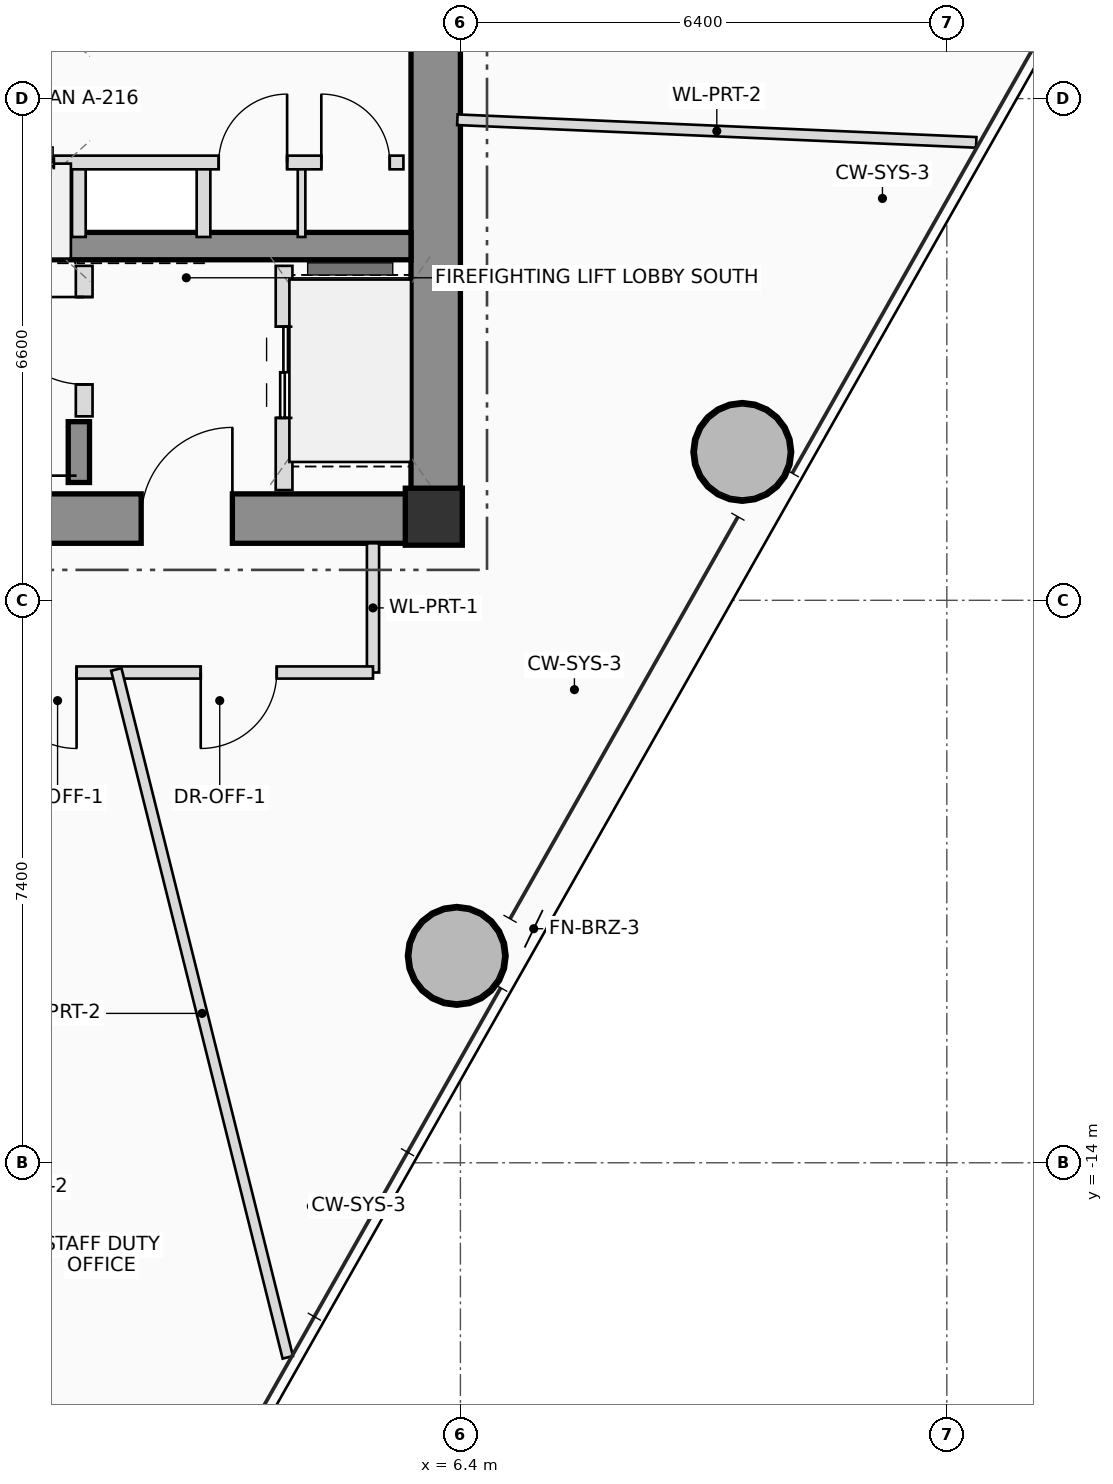
"""IFC4 building model, lengths in metres.
Left out: names, types, materials, properties, quantities, classifications, styles, units other than length and angle.
Written with IfcOpenShell. Run it as: python <this file> out.ifc"""

import sys

from ifc_helpers import new_model, si_unit, direction, frame, frame_2d, origin, origin_2d, place, context, subcontext, project, spatial, rectangle, hollow_circle, extrude, source, transform, mapped, element, fill, save


model = new_model("IFC4")
c1 = context("Model", 3, precision=1e-05, world=origin(), true_north=direction((0.0, 1.0)))
c2 = subcontext(c1, "Body", "Model", "MODEL_VIEW")
j1 = project(units=[si_unit("LENGTHUNIT", "METRE"), si_unit("PLANEANGLEUNIT", "RADIAN")], contexts=[c1])
p1 = place(None, origin())
s1 = spatial("IfcSite", under=j1, at=p1, CompositionType="ELEMENT")
p2 = place(p1, origin())
s2 = spatial("IfcBuilding", under=s1, at=p2, CompositionType="ELEMENT")
p3 = place(p2, frame((0.0, 0.0, 169.1)))
s3 = spatial("IfcBuildingStorey", under=s2, at=p3, CompositionType="ELEMENT", Elevation=169.1)
m1 = source(origin(), c2, "Body", "SweptSolid", [
    extrude(rectangle(XDim=0.75, YDim=0.75, at=origin_2d()), origin(), (0.0, 0.0, 1.0), 3.45),
])
p4 = place(p3, frame((6.05, -5.5, 0.0), z_axis=(0.0, 0.0, 1.0), x_axis=(1.0, 0.0, 0.0)))
e1 = element("IfcColumn", 1, at=p4, inside=s3, PredefinedType="COLUMN", context=c2, shape_type="MappedRepresentation", body=[
    mapped(m1, transform((0.0, 0.0, 0.0), scale=1.0)),
])
p5 = place(p3, frame((-6.4, -5.525, 0.0), z_axis=(0.0, 0.0, 1.0), x_axis=(1.0, 0.0, 0.0)))
e2 = element("IfcWall", 2, at=p5, inside=s3, PredefinedType="SHEAR", context=c2, shape_type="SweptSolid", body=[
    extrude(rectangle(XDim=12.8, YDim=0.65, at=frame_2d((6.4, 0.0))), origin(), (0.0, 0.0, 1.0), 3.45),
])
p6 = place(p5, frame((8.6, 0.0, 0.0)))
e3 = element("IfcOpeningElement", 3, at=p6, cuts=e2, PredefinedType="OPENING", context=c2, shape_type="SweptSolid", body=[
    extrude(rectangle(XDim=1.2, YDim=2.2, at=frame_2d((0.6, 1.1))), frame((0.0, 0.335, 0.0), z_axis=(0.0, -1.0, 0.0), x_axis=(1.0, 0.0, 0.0)), (0.0, 0.0, 1.0), 0.67),
])
p7 = place(p3, frame((6.075, -5.2, 0.0), z_axis=(0.0, 0.0, 1.0), x_axis=(0.0, 1.0, 0.0)))
e4 = element("IfcWall", 4, at=p7, inside=s3, PredefinedType="SHEAR", context=c2, shape_type="SweptSolid", body=[
    extrude(rectangle(XDim=10.4, YDim=0.65, at=frame_2d((5.2, 0.0))), origin(), (0.0, 0.0, 1.0), 3.45),
])
p8 = place(p3, frame((-5.75, -1.94, 0.0), z_axis=(0.0, 0.0, 1.0), x_axis=(1.0, 0.0, 0.0)))
e5 = element("IfcWall", 5, at=p8, inside=s3, PredefinedType="SHEAR", context=c2, shape_type="SweptSolid", body=[
    extrude(rectangle(XDim=11.5, YDim=0.36, at=frame_2d((5.75, 0.0))), origin(), (0.0, 0.0, 1.0), 3.45),
])
p9 = place(p3, frame((1.38, -5.05, 0.0), z_axis=(0.0, 0.0, 1.0), x_axis=(0.0, 1.0, 0.0)))
e6 = element("IfcWall", 6, at=p9, inside=s3, PredefinedType="SHEAR", context=c2, shape_type="SweptSolid", body=[
    extrude(rectangle(XDim=0.8, YDim=0.28, at=frame_2d((0.4, 0.0))), origin(), (0.0, 0.0, 1.0), 3.45),
])
m2 = source(origin(), c2, "Body", "SweptSolid", [
    extrude(hollow_circle(Radius=0.65, WallThickness=0.045, at=origin_2d()), origin(), (0.0, 0.0, 1.0), 3.45),
])
for number, where, z_axis, x_axis in (
    (7, (6.352, -11.278, 0.0), (0.0, 0.0, 1.0), (1.0, 0.0, 0.0)),
    (8, (10.109, -4.648, 0.0), (0.0, 0.0, 1.0), (1.0, 0.0, 0.0)),
):
    element("IfcColumn", number, at=place(p3, frame(where, z_axis=z_axis, x_axis=x_axis)), inside=s3, PredefinedType="COLUMN", context=c2, shape_type="MappedRepresentation", body=[
        mapped(m2, transform((0.0, 0.0, 0.0), scale=1.0)),
    ])
p10 = place(p3, frame((1.45, -4.18, 0.0), z_axis=(0.0, 0.0, 1.0), x_axis=(0.0, 1.0, 0.0)))
e9 = element("IfcWall", 9, at=p10, inside=s3, PredefinedType="PLUMBINGWALL", context=c2, shape_type="SweptSolid", body=[
    extrude(rectangle(XDim=1.98, YDim=0.22, at=frame_2d((0.99, 0.0))), origin(), (0.0, 0.0, 1.0), 3.25),
])
p11 = place(p10, frame((0.42, 0.0, 0.0)))
e10 = element("IfcOpeningElement", 10, at=p11, cuts=e9, PredefinedType="OPENING", context=c2, shape_type="SweptSolid", body=[
    extrude(rectangle(XDim=1.15, YDim=2.15, at=frame_2d((0.575, 1.075))), frame((0.0, 0.12, 0.0), z_axis=(0.0, -1.0, 0.0), x_axis=(1.0, 0.0, 0.0)), (0.0, 0.0, 1.0), 0.24),
])
p12 = place(p3, frame((4.08, -5.15, 0.0), z_axis=(0.0, 0.0, 1.0), x_axis=(0.0, 1.0, 0.0)))
e11 = element("IfcWall", 11, at=p12, inside=s3, PredefinedType="PLUMBINGWALL", context=c2, shape_type="SweptSolid", body=[
    extrude(rectangle(XDim=2.95, YDim=0.22, at=frame_2d((1.475, 0.0))), origin(), (0.0, 0.0, 1.0), 3.25),
])
p13 = place(p12, frame((0.95, 0.0, 0.0)))
e12 = element("IfcOpeningElement", 12, at=p13, cuts=e11, PredefinedType="OPENING", context=c2, shape_type="SweptSolid", body=[
    extrude(rectangle(XDim=1.2, YDim=2.25, at=frame_2d((0.6, 1.125))), frame((0.0, 0.12, 0.0), z_axis=(0.0, -1.0, 0.0), x_axis=(1.0, 0.0, 0.0)), (0.0, 0.0, 1.0), 0.24),
])
for number, where, z_axis, x_axis in (
    (13, (1.38, -1.82, 0.0), (0.0, 0.0, 1.0), (0.0, 1.0, 0.0)),
    (14, (3.02, -1.82, 0.0), (0.0, 0.0, 1.0), (0.0, 1.0, 0.0)),
):
    element("IfcWall", number, at=place(p3, frame(where, z_axis=z_axis, x_axis=x_axis)), inside=s3, PredefinedType="PLUMBINGWALL", context=c2, shape_type="SweptSolid", body=[
        extrude(rectangle(XDim=0.98, YDim=0.18, at=frame_2d((0.49, 0.0))), origin(), (0.0, 0.0, 1.0), 3.25),
    ])
p14 = place(p3, frame((4.31, -1.82, 0.0), z_axis=(0.0, 0.0, 1.0), x_axis=(0.0, 1.0, 0.0)))
e15 = element("IfcWall", 15, at=p14, inside=s3, PredefinedType="PARTITIONING", context=c2, shape_type="SweptSolid", body=[
    extrude(rectangle(XDim=0.98, YDim=0.1, at=frame_2d((0.49, 0.0))), origin(), (0.0, 0.0, 1.0), 3.25),
])
p15 = place(p3, frame((-5.68, -0.84, 0.0), z_axis=(0.0, 0.0, 1.0), x_axis=(1.0, 0.0, 0.0)))
e16 = element("IfcWall", 16, at=p15, inside=s3, PredefinedType="PLUMBINGWALL", context=c2, shape_type="SweptSolid", body=[
    extrude(rectangle(XDim=11.33, YDim=0.18, at=frame_2d((5.665, 0.0))), origin(), (0.0, 0.0, 1.0), 3.25),
])
p16 = place(p15, frame((1.18, 0.0, 0.0)))
e17 = element("IfcOpeningElement", 17, at=p16, cuts=e16, PredefinedType="OPENING", context=c2, shape_type="SweptSolid", body=[
    extrude(rectangle(XDim=0.9, YDim=2.05, at=frame_2d((0.45, 1.025))), frame((0.0, 0.1, 0.0), z_axis=(0.0, -1.0, 0.0), x_axis=(1.0, 0.0, 0.0)), (0.0, 0.0, 1.0), 0.2),
])
p17 = place(p15, frame((3.93, 0.0, 0.0)))
e18 = element("IfcOpeningElement", 18, at=p17, cuts=e16, PredefinedType="OPENING", context=c2, shape_type="SweptSolid", body=[
    extrude(rectangle(XDim=1.1, YDim=2.2, at=frame_2d((0.55, 1.1))), frame((0.0, 0.1, 0.0), z_axis=(0.0, -1.0, 0.0), x_axis=(1.0, 0.0, 0.0)), (0.0, 0.0, 1.0), 0.2),
])
p18 = place(p15, frame((5.63, 0.0, 0.0)))
e19 = element("IfcOpeningElement", 19, at=p18, cuts=e16, PredefinedType="OPENING", context=c2, shape_type="SweptSolid", body=[
    extrude(rectangle(XDim=1.1, YDim=2.2, at=frame_2d((0.55, 1.1))), frame((0.0, 0.1, 0.0), z_axis=(0.0, -1.0, 0.0), x_axis=(1.0, 0.0, 0.0)), (0.0, 0.0, 1.0), 0.2),
])
p19 = place(p15, frame((8.9, 0.0, 0.0)))
e20 = element("IfcOpeningElement", 20, at=p19, cuts=e16, PredefinedType="OPENING", context=c2, shape_type="SweptSolid", body=[
    extrude(rectangle(XDim=0.9, YDim=2.05, at=frame_2d((0.45, 1.025))), frame((0.0, 0.1, 0.0), z_axis=(0.0, -1.0, 0.0), x_axis=(1.0, 0.0, 0.0)), (0.0, 0.0, 1.0), 0.2),
])
p20 = place(p15, frame((10.25, 0.0, 0.0)))
e21 = element("IfcOpeningElement", 21, at=p20, cuts=e16, PredefinedType="OPENING", context=c2, shape_type="SweptSolid", body=[
    extrude(rectangle(XDim=0.9, YDim=2.05, at=frame_2d((0.45, 1.025))), frame((0.0, 0.1, 0.0), z_axis=(0.0, -1.0, 0.0), x_axis=(1.0, 0.0, 0.0)), (0.0, 0.0, 1.0), 0.2),
])
p21 = place(p3, frame((5.25, -5.85, 0.0), z_axis=(0.0, 0.0, 1.0), x_axis=(0.0, -1.0, 0.0)))
e22 = element("IfcWall", 22, at=p21, inside=s3, PredefinedType="PARTITIONING", context=c2, shape_type="SweptSolid", body=[
    extrude(rectangle(XDim=1.7, YDim=0.16, at=frame_2d((0.85, 0.0))), origin(), (0.0, 0.0, 1.0), 3.25),
])
p22 = place(p3, frame((5.25, -7.55, 0.0), z_axis=(0.0, 0.0, 1.0), x_axis=(-1.0, 0.0, 0.0)))
e23 = element("IfcWall", 23, at=p22, inside=s3, PredefinedType="PARTITIONING", context=c2, shape_type="SweptSolid", body=[
    extrude(rectangle(XDim=11.61, YDim=0.16, at=frame_2d((5.805, 0.0))), origin(), (0.0, 0.0, 1.0), 2.605),
])
p23 = place(p22, frame((1.267, 0.0, 0.0)))
e24 = element("IfcOpeningElement", 24, at=p23, cuts=e23, PredefinedType="OPENING", context=c2, shape_type="SweptSolid", body=[
    extrude(rectangle(XDim=1.0, YDim=2.25, at=frame_2d((0.5, 1.125))), frame((0.0, 0.09, 0.0), z_axis=(0.0, -1.0, 0.0), x_axis=(1.0, 0.0, 0.0)), (0.0, 0.0, 1.0), 0.18),
])
p24 = place(p22, frame((3.9, 0.0, 0.0)))
e25 = element("IfcOpeningElement", 25, at=p24, cuts=e23, PredefinedType="OPENING", context=c2, shape_type="SweptSolid", body=[
    extrude(rectangle(XDim=1.0, YDim=2.25, at=frame_2d((0.5, 1.125))), frame((0.0, 0.09, 0.0), z_axis=(0.0, -1.0, 0.0), x_axis=(1.0, 0.0, 0.0)), (0.0, 0.0, 1.0), 0.18),
])
p25 = place(p22, frame((7.936, 0.0, 0.0)))
e26 = element("IfcOpeningElement", 26, at=p25, cuts=e23, PredefinedType="OPENING", context=c2, shape_type="SweptSolid", body=[
    extrude(rectangle(XDim=1.0, YDim=2.25, at=frame_2d((0.5, 1.125))), frame((0.0, 0.09, 0.0), z_axis=(0.0, -1.0, 0.0), x_axis=(1.0, 0.0, 0.0)), (0.0, 0.0, 1.0), 0.18),
])
p26 = place(p3, frame((6.36, -0.278, 0.0), z_axis=(0.0, 0.0, 1.0), x_axis=(0.999047983793, -0.043624833281, 0.0)))
e27 = element("IfcWall", 27, at=p26, inside=s3, PredefinedType="PARTITIONING", context=c2, shape_type="SweptSolid", body=[
    extrude(rectangle(XDim=6.833, YDim=0.14, at=frame_2d((3.417, 0.0))), origin(), (0.0, 0.0, 1.0), 2.605),
])
p27 = place(p3, frame((1.873, -7.51, 0.0), z_axis=(0.0, 0.0, 1.0), x_axis=(0.241919667538, -0.970296281791, 0.0)))
e28 = element("IfcWall", 28, at=p27, inside=s3, PredefinedType="PARTITIONING", context=c2, shape_type="SweptSolid", body=[
    extrude(rectangle(XDim=9.327, YDim=0.14, at=frame_2d((4.664, 0.0))), origin(), (0.0, 0.0, 1.0), 2.605),
])
p28 = place(p6, origin())
e29 = element("IfcDoor", 29, at=p28, inside=s3, OperationType="SINGLE_SWING_RIGHT", PredefinedType="DOOR", context=c2, shape_type="SweptSolid", body=[
    extrude(rectangle(XDim=1.2, YDim=2.2, at=frame_2d((0.6, 1.1))), frame((0.0, 0.025, 0.0), z_axis=(0.0, -1.0, 0.0), x_axis=(1.0, 0.0, 0.0)), (0.0, 0.0, 1.0), 0.05),
])
fill(e3, e29)
p29 = place(p11, origin())
e30 = element("IfcDoor", 30, at=p29, inside=s3, OperationType="SINGLE_SWING_RIGHT", PredefinedType="DOOR", context=c2, shape_type="SweptSolid", body=[
    extrude(rectangle(XDim=1.15, YDim=2.15, at=frame_2d((0.575, 1.075))), frame((0.0, 0.025, 0.0), z_axis=(0.0, -1.0, 0.0), x_axis=(1.0, 0.0, 0.0)), (0.0, 0.0, 1.0), 0.05),
])
fill(e10, e30)
p30 = place(p13, origin())
e31 = element("IfcDoor", 31, at=p30, inside=s3, OperationType="DOUBLE_DOOR_SLIDING", PredefinedType="DOOR", context=c2, shape_type="SweptSolid", body=[
    extrude(rectangle(XDim=1.2, YDim=2.25, at=frame_2d((0.6, 1.125))), frame((0.0, 0.025, 0.0), z_axis=(0.0, -1.0, 0.0), x_axis=(1.0, 0.0, 0.0)), (0.0, 0.0, 1.0), 0.05),
])
fill(e12, e31)
p31 = place(p18, origin())
e32 = element("IfcDoor", 32, at=p31, inside=s3, OperationType="DOUBLE_DOOR_SLIDING", PredefinedType="DOOR", context=c2, shape_type="SweptSolid", body=[
    extrude(rectangle(XDim=1.1, YDim=2.2, at=frame_2d((0.55, 1.1))), frame((0.0, 0.025, 0.0), z_axis=(0.0, -1.0, 0.0), x_axis=(1.0, 0.0, 0.0)), (0.0, 0.0, 1.0), 0.05),
])
fill(e19, e32)
p32 = place(p19, origin())
e33 = element("IfcDoor", 33, at=p32, inside=s3, OperationType="SINGLE_SWING_RIGHT", PredefinedType="DOOR", context=c2, shape_type="SweptSolid", body=[
    extrude(rectangle(XDim=0.9, YDim=2.05, at=frame_2d((0.45, 1.025))), frame((0.0, 0.025, 0.0), z_axis=(0.0, -1.0, 0.0), x_axis=(1.0, 0.0, 0.0)), (0.0, 0.0, 1.0), 0.05),
])
fill(e20, e33)
p33 = place(p20, origin())
e34 = element("IfcDoor", 34, at=p33, inside=s3, OperationType="SINGLE_SWING_LEFT", PredefinedType="DOOR", context=c2, shape_type="SweptSolid", body=[
    extrude(rectangle(XDim=0.9, YDim=2.05, at=frame_2d((0.45, 1.025))), frame((0.0, 0.025, 0.0), z_axis=(0.0, -1.0, 0.0), x_axis=(1.0, 0.0, 0.0)), (0.0, 0.0, 1.0), 0.05),
])
fill(e21, e34)
p34 = place(p23, origin())
e35 = element("IfcDoor", 35, at=p34, inside=s3, OperationType="SINGLE_SWING_RIGHT", PredefinedType="DOOR", context=c2, shape_type="SweptSolid", body=[
    extrude(rectangle(XDim=1.0, YDim=2.25, at=frame_2d((0.5, 1.125))), frame((0.0, 0.025, 0.0), z_axis=(0.0, -1.0, 0.0), x_axis=(1.0, 0.0, 0.0)), (0.0, 0.0, 1.0), 0.05),
])
fill(e24, e35)
p35 = place(p24, origin())
e36 = element("IfcDoor", 36, at=p35, inside=s3, OperationType="SINGLE_SWING_LEFT", PredefinedType="DOOR", context=c2, shape_type="SweptSolid", body=[
    extrude(rectangle(XDim=1.0, YDim=2.25, at=frame_2d((0.5, 1.125))), frame((0.0, 0.025, 0.0), z_axis=(0.0, -1.0, 0.0), x_axis=(1.0, 0.0, 0.0)), (0.0, 0.0, 1.0), 0.05),
])
fill(e25, e36)
save(model, sys.argv[1])
